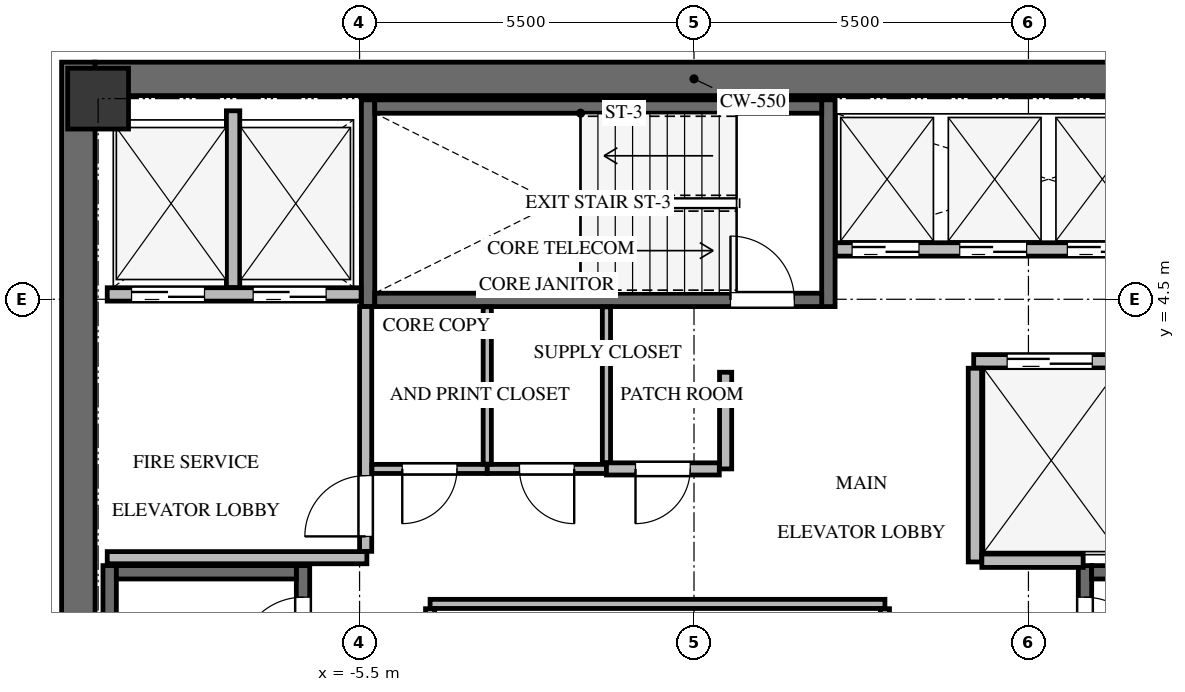
"""IFC4 building model, lengths in metres.
Left out: names, types, materials, properties, quantities, classifications, styles, units other than length and angle.
Written with IfcOpenShell. Run it as: python <this file> out.ifc"""

import sys

from ifc_helpers import new_model, si_unit, direction, frame, frame_2d, origin, origin_2d, place, context, subcontext, project, spatial, rectangle, extrude, source, transform, mapped, element, fill, save


model = new_model("IFC4")
c1 = context("Model", 3, precision=1e-05, world=origin(), true_north=direction((0.0, 1.0)))
c2 = subcontext(c1, "Body", "Model", "MODEL_VIEW")
j1 = project(units=[si_unit("LENGTHUNIT", "METRE"), si_unit("PLANEANGLEUNIT", "RADIAN")], contexts=[c1])
p1 = place(None, origin())
s1 = spatial("IfcSite", under=j1, at=p1, CompositionType="ELEMENT")
p2 = place(p1, origin())
s2 = spatial("IfcBuilding", under=s1, at=p2, CompositionType="ELEMENT")
p3 = place(p2, frame((0.0, 0.0, 231.5)))
s3 = spatial("IfcBuildingStorey", under=s2, at=p3, CompositionType="ELEMENT", Elevation=231.5)
p4 = place(p3, frame((-10.125, -8.4, 0.0), z_axis=(0.0, 0.0, 1.0), x_axis=(0.0, 1.0, 0.0)))
e1 = element("IfcWall", 1, at=p4, inside=s3, PredefinedType="SHEAR", context=c2, shape_type="SweptSolid", body=[
    extrude(rectangle(XDim=16.8, YDim=0.55, at=frame_2d((8.4, 0.0))), origin(), (0.0, 0.0, 1.0), 3.3),
])
p5 = place(p3, frame((-9.85, 8.125, 0.0), z_axis=(0.0, 0.0, 1.0), x_axis=(1.0, 0.0, 0.0)))
e2 = element("IfcWall", 2, at=p5, inside=s3, PredefinedType="SHEAR", context=c2, shape_type="SweptSolid", body=[
    extrude(rectangle(XDim=19.7, YDim=0.55, at=frame_2d((9.85, 0.0))), origin(), (0.0, 0.0, 1.0), 3.3),
])
p6 = place(p3, frame((-6.43, -7.77, -0.24), z_axis=(0.0, 0.0, 1.0), x_axis=(0.0, 1.0, 0.0)))
e3 = element("IfcWall", 3, at=p6, inside=s3, PredefinedType="SHEAR", context=c2, shape_type="SweptSolid", body=[
    extrude(rectangle(XDim=7.89, YDim=0.22, at=frame_2d((3.945, 0.0))), origin(), (0.0, 0.0, 1.0), 3.3),
])
p7 = place(p6, frame((6.32, 0.0, 0.0)))
e4 = element("IfcOpeningElement", 4, at=p7, cuts=e3, PredefinedType="OPENING", context=c2, shape_type="SweptSolid", body=[
    extrude(rectangle(XDim=1.05, YDim=2.15, at=frame_2d((0.525, 1.075))), frame((0.0, 0.12, 0.0), z_axis=(0.0, -1.0, 0.0), x_axis=(1.0, 0.0, 0.0)), (0.0, 0.0, 1.0), 0.24),
])
p8 = place(p3, frame((-9.61, 0.12, -0.24), z_axis=(0.0, 0.0, 1.0), x_axis=(0.0, -1.0, 0.0)))
e5 = element("IfcWall", 5, at=p8, inside=s3, PredefinedType="SHEAR", context=c2, shape_type="SweptSolid", body=[
    extrude(rectangle(XDim=7.89, YDim=0.22, at=frame_2d((3.945, 0.0))), origin(), (0.0, 0.0, 1.0), 3.3),
])
p9 = place(p3, frame((-6.54, 0.01, -0.24), z_axis=(0.0, 0.0, 1.0), x_axis=(-1.0, 0.0, 0.0)))
e6 = element("IfcWall", 6, at=p9, inside=s3, PredefinedType="SHEAR", context=c2, shape_type="SweptSolid", body=[
    extrude(rectangle(XDim=2.96, YDim=0.22, at=frame_2d((1.48, 0.0))), origin(), (0.0, 0.0, 1.0), 3.3),
])
p10 = place(p3, frame((6.43, 0.12, -0.24), z_axis=(0.0, 0.0, 1.0), x_axis=(0.0, -1.0, 0.0)))
e7 = element("IfcWall", 7, at=p10, inside=s3, PredefinedType="SHEAR", context=c2, shape_type="SweptSolid", body=[
    extrude(rectangle(XDim=7.89, YDim=0.22, at=frame_2d((3.945, 0.0))), origin(), (0.0, 0.0, 1.0), 3.3),
])
p11 = place(p10, frame((0.52, 0.0, 0.0)))
e8 = element("IfcOpeningElement", 8, at=p11, cuts=e7, PredefinedType="OPENING", context=c2, shape_type="SweptSolid", body=[
    extrude(rectangle(XDim=1.05, YDim=2.15, at=frame_2d((0.525, 1.075))), frame((0.0, 0.12, 0.0), z_axis=(0.0, -1.0, 0.0), x_axis=(1.0, 0.0, 0.0)), (0.0, 0.0, 1.0), 0.24),
])
p12 = place(p3, frame((9.5, 0.01, -0.24), z_axis=(0.0, 0.0, 1.0), x_axis=(-1.0, 0.0, 0.0)))
e9 = element("IfcWall", 9, at=p12, inside=s3, PredefinedType="SHEAR", context=c2, shape_type="SweptSolid", body=[
    extrude(rectangle(XDim=2.96, YDim=0.22, at=frame_2d((1.48, 0.0))), origin(), (0.0, 0.0, 1.0), 3.3),
])
for number, where, z_axis, x_axis in (
    (10, (2.21, 4.38, -0.24), (0.0, 0.0, 1.0), (0.0, 1.0, 0.0)),
    (11, (-5.36, 7.78, -0.24), (0.0, 0.0, 1.0), (0.0, -1.0, 0.0)),
):
    element("IfcWall", number, at=place(p3, frame(where, z_axis=z_axis, x_axis=x_axis)), inside=s3, PredefinedType="SHEAR", context=c2, shape_type="SweptSolid", body=[
        extrude(rectangle(XDim=3.4, YDim=0.22, at=frame_2d((1.7, 0.0))), origin(), (0.0, 0.0, 1.0), 3.3),
    ])
p13 = place(p3, frame((-5.25, 4.49, -0.24), z_axis=(0.0, 0.0, 1.0), x_axis=(1.0, 0.0, 0.0)))
e12 = element("IfcWall", 12, at=p13, inside=s3, PredefinedType="SHEAR", context=c2, shape_type="SweptSolid", body=[
    extrude(rectangle(XDim=7.35, YDim=0.22, at=frame_2d((3.675, 0.0))), origin(), (0.0, 0.0, 1.0), 3.3),
])
p14 = place(p13, frame((5.85, 0.0, 0.0)))
e13 = element("IfcOpeningElement", 13, at=p14, cuts=e12, PredefinedType="OPENING", context=c2, shape_type="SweptSolid", body=[
    extrude(rectangle(XDim=1.05, YDim=2.15, at=frame_2d((0.525, 1.075))), frame((0.0, 0.12, 0.0), z_axis=(0.0, -1.0, 0.0), x_axis=(1.0, 0.0, 0.0)), (0.0, 0.0, 1.0), 0.24),
])
p15 = place(p3, frame((2.1, 7.67, -0.24), z_axis=(0.0, 0.0, 1.0), x_axis=(-1.0, 0.0, 0.0)))
e14 = element("IfcWall", 14, at=p15, inside=s3, PredefinedType="SHEAR", context=c2, shape_type="SweptSolid", body=[
    extrude(rectangle(XDim=7.35, YDim=0.22, at=frame_2d((3.675, 0.0))), origin(), (0.0, 0.0, 1.0), 3.3),
])
m1 = source(origin(), c2, "Body", "SweptSolid", [
    extrude(rectangle(XDim=1.0, YDim=1.0, at=origin_2d()), origin(), (0.0, 0.0, 1.0), 3.3),
])
p16 = place(p3, frame((-9.8, 7.8, -0.24), z_axis=(0.0, 0.0, 1.0), x_axis=(1.0, 0.0, 0.0)))
e15 = element("IfcColumn", 15, at=p16, inside=s3, PredefinedType="COLUMN", context=c2, shape_type="MappedRepresentation", body=[
    mapped(m1, transform((0.0, 0.0, 0.0), x_axis=(1.0, 0.0, 0.0), y_axis=(0.0, 1.0, 0.0), z_axis=(0.0, 0.0, 1.0), scale=1.0)),
])
p17 = place(p3, frame((-9.65, 4.58, 0.0), z_axis=(0.0, 0.0, 1.0), x_axis=(1.0, 0.0, 0.0)))
e16 = element("IfcWall", 16, at=p17, inside=s3, PredefinedType="SOLIDWALL", context=c2, shape_type="SweptSolid", body=[
    extrude(rectangle(XDim=4.175, YDim=0.22, at=frame_2d((2.087, 0.0))), origin(), (0.0, 0.0, 1.0), 3.045),
])
p18 = place(p17, frame((0.4, 0.0, 0.0)))
e17 = element("IfcOpeningElement", 17, at=p18, cuts=e16, PredefinedType="OPENING", context=c2, shape_type="SweptSolid", body=[
    extrude(rectangle(XDim=1.2, YDim=2.15, at=frame_2d((0.6, 1.075))), frame((0.0, 0.12, 0.0), z_axis=(0.0, -1.0, 0.0), x_axis=(1.0, 0.0, 0.0)), (0.0, 0.0, 1.0), 0.24),
])
p19 = place(p17, frame((2.4, 0.0, 0.0)))
e18 = element("IfcOpeningElement", 18, at=p19, cuts=e16, PredefinedType="OPENING", context=c2, shape_type="SweptSolid", body=[
    extrude(rectangle(XDim=1.2, YDim=2.15, at=frame_2d((0.6, 1.075))), frame((0.0, 0.12, 0.0), z_axis=(0.0, -1.0, 0.0), x_axis=(1.0, 0.0, 0.0)), (0.0, 0.0, 1.0), 0.24),
])
p20 = place(p3, frame((-7.58, 4.694, 0.0), z_axis=(0.0, 0.0, 1.0), x_axis=(0.0, 1.0, 0.0)))
e19 = element("IfcWall", 19, at=p20, inside=s3, PredefinedType="SOLIDWALL", context=c2, shape_type="SweptSolid", body=[
    extrude(rectangle(XDim=2.906, YDim=0.22, at=frame_2d((1.453, 0.0))), origin(), (0.0, 0.0, 1.0), 3.045),
])
p21 = place(p3, frame((-9.65, 0.25, 0.0), z_axis=(0.0, 0.0, 1.0), x_axis=(1.0, 0.0, 0.0)))
e20 = element("IfcWall", 20, at=p21, inside=s3, PredefinedType="SOLIDWALL", context=c2, shape_type="SweptSolid", body=[
    extrude(rectangle(XDim=4.27, YDim=0.2, at=frame_2d((2.135, 0.0))), origin(), (0.0, 0.0, 1.0), 3.045),
])
p22 = place(p3, frame((-5.4, 0.354, 0.0), z_axis=(0.0, 0.0, 1.0), x_axis=(0.0, 1.0, 0.0)))
e21 = element("IfcWall", 21, at=p22, inside=s3, PredefinedType="SOLIDWALL", context=c2, shape_type="SweptSolid", body=[
    extrude(rectangle(XDim=4.026, YDim=0.2, at=frame_2d((2.013, 0.0))), origin(), (0.0, 0.0, 1.0), 3.045),
])
p23 = place(p22, frame((0.246, 0.0, 0.0)))
e22 = element("IfcOpeningElement", 22, at=p23, cuts=e21, PredefinedType="OPENING", context=c2, shape_type="SweptSolid", body=[
    extrude(rectangle(XDim=1.0, YDim=2.15, at=frame_2d((0.5, 1.075))), frame((0.0, 0.11, 0.0), z_axis=(0.0, -1.0, 0.0), x_axis=(1.0, 0.0, 0.0)), (0.0, 0.0, 1.0), 0.22),
])
p24 = place(p3, frame((4.6, 3.48, 0.0), z_axis=(0.0, 0.0, 1.0), x_axis=(1.0, 0.0, 0.0)))
e23 = element("IfcWall", 23, at=p24, inside=s3, PredefinedType="SOLIDWALL", context=c2, shape_type="SweptSolid", body=[
    extrude(rectangle(XDim=5.05, YDim=0.22, at=frame_2d((2.525, 0.0))), origin(), (0.0, 0.0, 1.0), 3.045),
])
p25 = place(p24, frame((0.55, 0.0, 0.0)))
e24 = element("IfcOpeningElement", 24, at=p25, cuts=e23, PredefinedType="OPENING", context=c2, shape_type="SweptSolid", body=[
    extrude(rectangle(XDim=1.4, YDim=2.15, at=frame_2d((0.7, 1.075))), frame((0.0, 0.12, 0.0), z_axis=(0.0, -1.0, 0.0), x_axis=(1.0, 0.0, 0.0)), (0.0, 0.0, 1.0), 0.24),
])
p26 = place(p24, frame((3.05, 0.0, 0.0)))
e25 = element("IfcOpeningElement", 25, at=p26, cuts=e23, PredefinedType="OPENING", context=c2, shape_type="SweptSolid", body=[
    extrude(rectangle(XDim=1.4, YDim=2.15, at=frame_2d((0.7, 1.075))), frame((0.0, 0.12, 0.0), z_axis=(0.0, -1.0, 0.0), x_axis=(1.0, 0.0, 0.0)), (0.0, 0.0, 1.0), 0.24),
])
p27 = place(p3, frame((4.62, 0.18, 0.0), z_axis=(0.0, 0.0, 1.0), x_axis=(0.0, 1.0, 0.0)))
e26 = element("IfcWall", 26, at=p27, inside=s3, PredefinedType="SOLIDWALL", context=c2, shape_type="SweptSolid", body=[
    extrude(rectangle(XDim=3.186, YDim=0.22, at=frame_2d((1.593, 0.0))), origin(), (0.0, 0.0, 1.0), 3.045),
])
p28 = place(p3, frame((4.734, 0.2, 0.0), z_axis=(0.0, 0.0, 1.0), x_axis=(1.0, 0.0, 0.0)))
e27 = element("IfcWall", 27, at=p28, inside=s3, PredefinedType="SOLIDWALL", context=c2, shape_type="SweptSolid", body=[
    extrude(rectangle(XDim=1.666, YDim=0.22, at=frame_2d((0.833, 0.0))), origin(), (0.0, 0.0, 1.0), 3.045),
])
p29 = place(p3, frame((2.325, 5.32, 0.0), z_axis=(0.0, 0.0, 1.0), x_axis=(1.0, 0.0, 0.0)))
e28 = element("IfcWall", 28, at=p29, inside=s3, PredefinedType="SOLIDWALL", context=c2, shape_type="SweptSolid", body=[
    extrude(rectangle(XDim=7.325, YDim=0.22, at=frame_2d((3.663, 0.0))), origin(), (0.0, 0.0, 1.0), 3.045),
])
p30 = place(p29, frame((0.275, 0.0, 0.0)))
e29 = element("IfcOpeningElement", 29, at=p30, cuts=e28, PredefinedType="OPENING", context=c2, shape_type="SweptSolid", body=[
    extrude(rectangle(XDim=1.1, YDim=2.15, at=frame_2d((0.55, 1.075))), frame((0.0, 0.12, 0.0), z_axis=(0.0, -1.0, 0.0), x_axis=(1.0, 0.0, 0.0)), (0.0, 0.0, 1.0), 0.24),
])
p31 = place(p29, frame((2.045, 0.0, 0.0)))
e30 = element("IfcOpeningElement", 30, at=p31, cuts=e28, PredefinedType="OPENING", context=c2, shape_type="SweptSolid", body=[
    extrude(rectangle(XDim=1.1, YDim=2.15, at=frame_2d((0.55, 1.075))), frame((0.0, 0.12, 0.0), z_axis=(0.0, -1.0, 0.0), x_axis=(1.0, 0.0, 0.0)), (0.0, 0.0, 1.0), 0.24),
])
p32 = place(p29, frame((3.815, 0.0, 0.0)))
e31 = element("IfcOpeningElement", 31, at=p32, cuts=e28, PredefinedType="OPENING", context=c2, shape_type="SweptSolid", body=[
    extrude(rectangle(XDim=1.1, YDim=2.15, at=frame_2d((0.55, 1.075))), frame((0.0, 0.12, 0.0), z_axis=(0.0, -1.0, 0.0), x_axis=(1.0, 0.0, 0.0)), (0.0, 0.0, 1.0), 0.24),
])
p33 = place(p29, frame((5.585, 0.0, 0.0)))
e32 = element("IfcOpeningElement", 32, at=p33, cuts=e28, PredefinedType="OPENING", context=c2, shape_type="SweptSolid", body=[
    extrude(rectangle(XDim=1.1, YDim=2.15, at=frame_2d((0.55, 1.075))), frame((0.0, 0.12, 0.0), z_axis=(0.0, -1.0, 0.0), x_axis=(1.0, 0.0, 0.0)), (0.0, 0.0, 1.0), 0.24),
])
p34 = place(p3, frame((-4.34, -0.51, 0.0), z_axis=(0.0, 0.0, 1.0), x_axis=(1.0, 0.0, 0.0)))
e33 = element("IfcWall", 33, at=p34, inside=s3, PredefinedType="PARTITIONING", context=c2, shape_type="SweptSolid", body=[
    extrude(rectangle(XDim=7.48, YDim=0.15, at=frame_2d((3.74, 0.0))), origin(), (0.0, 0.0, 1.0), 3.045),
])
for number, where, z_axis, x_axis in (
    (34, (-4.34, -2.961, 0.0), (0.0, 0.0, 1.0), (0.0, 1.0, 0.0)),
    (35, (3.14, -0.589, 0.0), (0.0, 0.0, 1.0), (0.0, -1.0, 0.0)),
):
    element("IfcWall", number, at=place(p3, frame(where, z_axis=z_axis, x_axis=x_axis)), inside=s3, PredefinedType="PARTITIONING", context=c2, shape_type="SweptSolid", body=[
        extrude(rectangle(XDim=2.372, YDim=0.15, at=frame_2d((1.186, 0.0))), origin(), (0.0, 0.0, 1.0), 3.045),
    ])
p35 = place(p3, frame((-3.4, 1.71, 0.0), z_axis=(0.0, 0.0, 1.0), x_axis=(-1.0, 0.0, 0.0)))
e36 = element("IfcWall", 36, at=p35, inside=s3, PredefinedType="PARTITIONING", context=c2, shape_type="SweptSolid", body=[
    extrude(rectangle(XDim=1.896, YDim=0.15, at=frame_2d((0.948, 0.0))), origin(), (0.0, 0.0, 1.0), 3.045),
])
p36 = place(p35, frame((0.498, 0.0, 0.0)))
e37 = element("IfcOpeningElement", 37, at=p36, cuts=e36, PredefinedType="OPENING", context=c2, shape_type="SweptSolid", body=[
    extrude(rectangle(XDim=0.9, YDim=2.05, at=frame_2d((0.45, 1.025))), frame((0.0, 0.085, 0.0), z_axis=(0.0, -1.0, 0.0), x_axis=(1.0, 0.0, 0.0)), (0.0, 0.0, 1.0), 0.17),
])
p37 = place(p3, frame((-1.44, 1.71, 0.0), z_axis=(0.0, 0.0, 1.0), x_axis=(-1.0, 0.0, 0.0)))
e38 = element("IfcWall", 38, at=p37, inside=s3, PredefinedType="PARTITIONING", context=c2, shape_type="SweptSolid", body=[
    extrude(rectangle(XDim=1.96, YDim=0.15, at=frame_2d((0.98, 0.0))), origin(), (0.0, 0.0, 1.0), 3.045),
])
p38 = place(p37, frame((0.53, 0.0, 0.0)))
e39 = element("IfcOpeningElement", 39, at=p38, cuts=e38, PredefinedType="OPENING", context=c2, shape_type="SweptSolid", body=[
    extrude(rectangle(XDim=0.9, YDim=2.05, at=frame_2d((0.45, 1.025))), frame((0.0, 0.085, 0.0), z_axis=(0.0, -1.0, 0.0), x_axis=(1.0, 0.0, 0.0)), (0.0, 0.0, 1.0), 0.17),
])
p39 = place(p3, frame((0.52, 3.3, 0.0), z_axis=(0.0, 0.0, 1.0), x_axis=(0.0, -1.0, 0.0)))
e40 = element("IfcWall", 40, at=p39, inside=s3, PredefinedType="SOLIDWALL", context=c2, shape_type="SweptSolid", body=[
    extrude(rectangle(XDim=1.59, YDim=0.2, at=frame_2d((0.795, 0.0))), origin(), (0.0, 0.0, 1.0), 3.045),
])
p40 = place(p3, frame((0.416, 1.71, 0.0), z_axis=(0.0, 0.0, 1.0), x_axis=(-1.0, 0.0, 0.0)))
e41 = element("IfcWall", 41, at=p40, inside=s3, PredefinedType="SOLIDWALL", context=c2, shape_type="SweptSolid", body=[
    extrude(rectangle(XDim=1.856, YDim=0.2, at=frame_2d((0.928, 0.0))), origin(), (0.0, 0.0, 1.0), 3.045),
])
p41 = place(p40, frame((0.478, 0.0, 0.0)))
e42 = element("IfcOpeningElement", 42, at=p41, cuts=e41, PredefinedType="OPENING", context=c2, shape_type="SweptSolid", body=[
    extrude(rectangle(XDim=0.9, YDim=2.05, at=frame_2d((0.45, 1.025))), frame((0.0, 0.11, 0.0), z_axis=(0.0, -1.0, 0.0), x_axis=(1.0, 0.0, 0.0)), (0.0, 0.0, 1.0), 0.22),
])
p42 = place(p3, frame((-3.4, 4.375, 0.0), z_axis=(0.0, 0.0, 1.0), x_axis=(0.0, -1.0, 0.0)))
e43 = element("IfcWall", 43, at=p42, inside=s3, PredefinedType="PARTITIONING", context=c2, shape_type="SweptSolid", body=[
    extrude(rectangle(XDim=2.586, YDim=0.135, at=frame_2d((1.293, 0.0))), origin(), (0.0, 0.0, 1.0), 3.045),
])
p43 = place(p3, frame((-1.44, 4.375, 0.0), z_axis=(0.0, 0.0, 1.0), x_axis=(0.0, -1.0, 0.0)))
e44 = element("IfcWall", 44, at=p43, inside=s3, PredefinedType="PARTITIONING", context=c2, shape_type="SweptSolid", body=[
    extrude(rectangle(XDim=2.561, YDim=0.135, at=frame_2d((1.281, 0.0))), origin(), (0.0, 0.0, 1.0), 3.045),
])
m2 = source(origin(), c2, "Body", "SweptSolid", [
    extrude(rectangle(XDim=1.05, YDim=2.15, at=frame_2d((0.525, 1.075))), frame((0.0, 0.025, 0.0), z_axis=(0.0, -1.0, 0.0), x_axis=(1.0, 0.0, 0.0)), (0.0, 0.0, 1.0), 0.05),
])
p44 = place(p7, origin())
e45 = element("IfcDoor", 45, at=p44, inside=s3, OperationType="SINGLE_SWING_LEFT", PredefinedType="DOOR", context=c2, shape_type="MappedRepresentation", body=[
    mapped(m2, transform((0.0, 0.0, 0.0), x_axis=(1.0, 0.0, 0.0), y_axis=(0.0, 1.0, 0.0), z_axis=(0.0, 0.0, 1.0), scale=1.0)),
])
fill(e4, e45)
m3 = source(origin(), c2, "Body", "SweptSolid", [
    extrude(rectangle(XDim=1.05, YDim=2.15, at=frame_2d((0.525, 1.075))), frame((0.0, 0.025, 0.0), z_axis=(0.0, -1.0, 0.0), x_axis=(1.0, 0.0, 0.0)), (0.0, 0.0, 1.0), 0.05),
])
p45 = place(p11, origin())
e46 = element("IfcDoor", 46, at=p45, inside=s3, OperationType="SINGLE_SWING_RIGHT", PredefinedType="DOOR", context=c2, shape_type="MappedRepresentation", body=[
    mapped(m3, transform((0.0, 0.0, 0.0), x_axis=(1.0, 0.0, 0.0), y_axis=(0.0, 1.0, 0.0), z_axis=(0.0, 0.0, 1.0), scale=1.0)),
])
fill(e8, e46)
p46 = place(p14, origin())
e47 = element("IfcDoor", 47, at=p46, inside=s3, OperationType="SINGLE_SWING_LEFT", PredefinedType="DOOR", context=c2, shape_type="MappedRepresentation", body=[
    mapped(m2, transform((0.0, 0.0, 0.0), x_axis=(1.0, 0.0, 0.0), y_axis=(0.0, 1.0, 0.0), z_axis=(0.0, 0.0, 1.0), scale=1.0)),
])
fill(e13, e47)
m4 = source(origin(), c2, "Body", "SweptSolid", [
    extrude(rectangle(XDim=1.2, YDim=2.15, at=frame_2d((0.6, 1.075))), frame((0.0, 0.025, 0.0), z_axis=(0.0, -1.0, 0.0), x_axis=(1.0, 0.0, 0.0)), (0.0, 0.0, 1.0), 0.05),
])
p47 = place(p18, origin())
e48 = element("IfcDoor", 48, at=p47, inside=s3, OperationType="DOUBLE_DOOR_SLIDING", PredefinedType="DOOR", context=c2, shape_type="MappedRepresentation", body=[
    mapped(m4, transform((0.0, 0.0, 0.0), x_axis=(1.0, 0.0, 0.0), y_axis=(0.0, 1.0, 0.0), z_axis=(0.0, 0.0, 1.0), scale=1.0)),
])
fill(e17, e48)
p48 = place(p19, origin())
e49 = element("IfcDoor", 49, at=p48, inside=s3, OperationType="DOUBLE_DOOR_SLIDING", PredefinedType="DOOR", context=c2, shape_type="MappedRepresentation", body=[
    mapped(m4, transform((0.0, 0.0, 0.0), x_axis=(1.0, 0.0, 0.0), y_axis=(0.0, 1.0, 0.0), z_axis=(0.0, 0.0, 1.0), scale=1.0)),
])
fill(e18, e49)
m5 = source(origin(), c2, "Body", "SweptSolid", [
    extrude(rectangle(XDim=1.0, YDim=2.15, at=frame_2d((0.5, 1.075))), frame((0.0, 0.025, 0.0), z_axis=(0.0, -1.0, 0.0), x_axis=(1.0, 0.0, 0.0)), (0.0, 0.0, 1.0), 0.05),
])
p49 = place(p23, origin())
e50 = element("IfcDoor", 50, at=p49, inside=s3, OperationType="SINGLE_SWING_LEFT", PredefinedType="DOOR", context=c2, shape_type="MappedRepresentation", body=[
    mapped(m5, transform((0.0, 0.0, 0.0), x_axis=(1.0, 0.0, 0.0), y_axis=(0.0, 1.0, 0.0), z_axis=(0.0, 0.0, 1.0), scale=1.0)),
])
fill(e22, e50)
m6 = source(origin(), c2, "Body", "SweptSolid", [
    extrude(rectangle(XDim=1.4, YDim=2.15, at=frame_2d((0.7, 1.075))), frame((0.0, 0.025, 0.0), z_axis=(0.0, -1.0, 0.0), x_axis=(1.0, 0.0, 0.0)), (0.0, 0.0, 1.0), 0.05),
])
p50 = place(p25, origin())
e51 = element("IfcDoor", 51, at=p50, inside=s3, OperationType="DOUBLE_DOOR_SLIDING", PredefinedType="DOOR", context=c2, shape_type="MappedRepresentation", body=[
    mapped(m6, transform((0.0, 0.0, 0.0), x_axis=(1.0, 0.0, 0.0), y_axis=(0.0, 1.0, 0.0), z_axis=(0.0, 0.0, 1.0), scale=1.0)),
])
fill(e24, e51)
m7 = source(origin(), c2, "Body", "SweptSolid", [
    extrude(rectangle(XDim=1.1, YDim=2.15, at=frame_2d((0.55, 1.075))), frame((0.0, 0.025, 0.0), z_axis=(0.0, -1.0, 0.0), x_axis=(1.0, 0.0, 0.0)), (0.0, 0.0, 1.0), 0.05),
])
p51 = place(p30, origin())
e52 = element("IfcDoor", 52, at=p51, inside=s3, OperationType="DOUBLE_DOOR_SLIDING", PredefinedType="DOOR", context=c2, shape_type="MappedRepresentation", body=[
    mapped(m7, transform((0.0, 0.0, 0.0), x_axis=(1.0, 0.0, 0.0), y_axis=(0.0, 1.0, 0.0), z_axis=(0.0, 0.0, 1.0), scale=1.0)),
])
fill(e29, e52)
p52 = place(p31, origin())
e53 = element("IfcDoor", 53, at=p52, inside=s3, OperationType="DOUBLE_DOOR_SLIDING", PredefinedType="DOOR", context=c2, shape_type="MappedRepresentation", body=[
    mapped(m7, transform((0.0, 0.0, 0.0), x_axis=(1.0, 0.0, 0.0), y_axis=(0.0, 1.0, 0.0), z_axis=(0.0, 0.0, 1.0), scale=1.0)),
])
fill(e30, e53)
p53 = place(p32, origin())
e54 = element("IfcDoor", 54, at=p53, inside=s3, OperationType="DOUBLE_DOOR_SLIDING", PredefinedType="DOOR", context=c2, shape_type="MappedRepresentation", body=[
    mapped(m7, transform((0.0, 0.0, 0.0), x_axis=(1.0, 0.0, 0.0), y_axis=(0.0, 1.0, 0.0), z_axis=(0.0, 0.0, 1.0), scale=1.0)),
])
fill(e31, e54)
m8 = source(origin(), c2, "Body", "SweptSolid", [
    extrude(rectangle(XDim=0.9, YDim=2.05, at=frame_2d((0.45, 1.025))), frame((0.0, 0.025, 0.0), z_axis=(0.0, -1.0, 0.0), x_axis=(1.0, 0.0, 0.0)), (0.0, 0.0, 1.0), 0.05),
])
p54 = place(p36, origin())
e55 = element("IfcDoor", 55, at=p54, inside=s3, OperationType="SINGLE_SWING_RIGHT", PredefinedType="DOOR", context=c2, shape_type="MappedRepresentation", body=[
    mapped(m8, transform((0.0, 0.0, 0.0), x_axis=(1.0, 0.0, 0.0), y_axis=(0.0, 1.0, 0.0), z_axis=(0.0, 0.0, 1.0), scale=1.0)),
])
fill(e37, e55)
m9 = source(origin(), c2, "Body", "SweptSolid", [
    extrude(rectangle(XDim=0.9, YDim=2.05, at=frame_2d((0.45, 1.025))), frame((0.0, 0.025, 0.0), z_axis=(0.0, -1.0, 0.0), x_axis=(1.0, 0.0, 0.0)), (0.0, 0.0, 1.0), 0.05),
])
p55 = place(p38, origin())
e56 = element("IfcDoor", 56, at=p55, inside=s3, OperationType="SINGLE_SWING_LEFT", PredefinedType="DOOR", context=c2, shape_type="MappedRepresentation", body=[
    mapped(m9, transform((0.0, 0.0, 0.0), x_axis=(1.0, 0.0, 0.0), y_axis=(0.0, 1.0, 0.0), z_axis=(0.0, 0.0, 1.0), scale=1.0)),
])
fill(e39, e56)
p56 = place(p41, origin())
e57 = element("IfcDoor", 57, at=p56, inside=s3, OperationType="SINGLE_SWING_RIGHT", PredefinedType="DOOR", context=c2, shape_type="MappedRepresentation", body=[
    mapped(m8, transform((0.0, 0.0, 0.0), x_axis=(1.0, 0.0, 0.0), y_axis=(0.0, 1.0, 0.0), z_axis=(0.0, 0.0, 1.0), scale=1.0)),
])
fill(e42, e57)
save(model, sys.argv[1])
